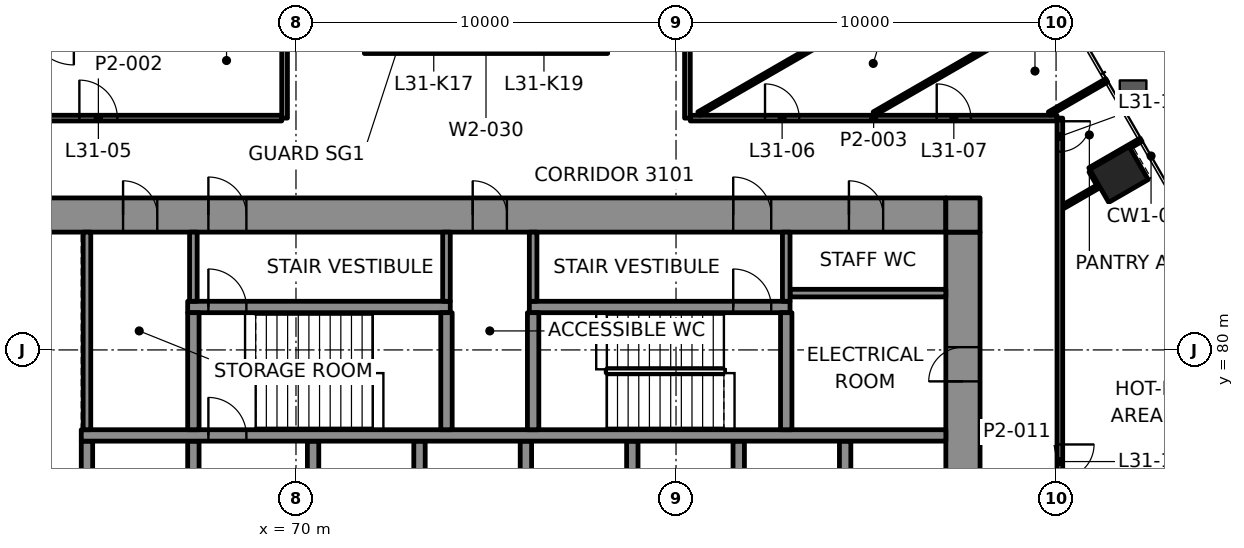
"""IFC4 building model, lengths in metres.
Left out: names, types, materials, properties, quantities, classifications, styles, units other than length and angle.
Written with IfcOpenShell. Run it as: python <this file> out.ifc"""

import sys

from ifc_helpers import new_model, si_unit, direction, frame, frame_2d, origin, origin_2d, place, context, subcontext, project, spatial, rectangle, extrude, element, fill, save


model = new_model("IFC4")
c1 = context("Model", 3, precision=1e-05, world=origin(), true_north=direction((0.0, 1.0)))
c2 = subcontext(c1, "Body", "Model", "MODEL_VIEW")
j1 = project(units=[si_unit("LENGTHUNIT", "METRE"), si_unit("PLANEANGLEUNIT", "RADIAN")], contexts=[c1])
p1 = place(None, origin())
s1 = spatial("IfcSite", under=j1, at=p1, CompositionType="ELEMENT")
p2 = place(p1, origin())
s2 = spatial("IfcBuilding", under=s1, at=p2, CompositionType="ELEMENT")
p3 = place(p2, frame((0.0, 0.0, 136.6)))
s3 = spatial("IfcBuildingStorey", under=s2, at=p3, CompositionType="ELEMENT", Elevation=136.6)
p4 = place(p3, frame((91.655, 84.616, -0.0), z_axis=(0.0, 0.0, 1.0), x_axis=(-0.5, 0.866025403784, 0.0)))
e1 = element("IfcColumn", 1, at=p4, inside=s3, PredefinedType="COLUMN", context=c2, shape_type="SweptSolid", body=[
    extrude(rectangle(XDim=1.0, YDim=1.2, at=origin_2d()), origin(), (0.0, 0.0, 1.0), 4.2),
])
p5 = place(p3, frame((62.0, 83.55, 0.0), z_axis=(0.0, 0.0, 1.0), x_axis=(1.0, 0.0, 0.0)))
e2 = element("IfcWall", 2, at=p5, inside=s3, PredefinedType="SHEAR", context=c2, shape_type="SweptSolid", body=[
    extrude(rectangle(XDim=25.1, YDim=0.9, at=frame_2d((12.55, 0.0))), origin(), (0.0, 0.0, 1.0), 3.9),
])
p6 = place(p5, frame((5.695, 0.0, 0.0)))
e3 = element("IfcOpeningElement", 3, at=p6, cuts=e2, PredefinedType="OPENING", context=c2, shape_type="SweptSolid", body=[
    extrude(rectangle(XDim=1.0, YDim=2.1, at=frame_2d((0.5, 1.05))), frame((0.0, 0.46, 0.0), z_axis=(0.0, -1.0, 0.0), x_axis=(1.0, 0.0, 0.0)), (0.0, 0.0, 1.0), 0.92),
])
p7 = place(p5, frame((19.505, 0.0, 0.0)))
e4 = element("IfcOpeningElement", 4, at=p7, cuts=e2, PredefinedType="OPENING", context=c2, shape_type="SweptSolid", body=[
    extrude(rectangle(XDim=1.0, YDim=2.1, at=frame_2d((0.5, 1.05))), frame((0.0, 0.46, 0.0), z_axis=(0.0, -1.0, 0.0), x_axis=(1.0, 0.0, 0.0)), (0.0, 0.0, 1.0), 0.92),
])
p8 = place(p5, frame((3.45, 0.0, 0.0)))
e5 = element("IfcOpeningElement", 5, at=p8, cuts=e2, PredefinedType="OPENING", context=c2, shape_type="SweptSolid", body=[
    extrude(rectangle(XDim=0.9, YDim=2.1, at=frame_2d((0.45, 1.05))), frame((0.0, 0.46, 0.0), z_axis=(0.0, -1.0, 0.0), x_axis=(1.0, 0.0, 0.0)), (0.0, 0.0, 1.0), 0.92),
])
p9 = place(p5, frame((12.65, 0.0, 0.0)))
e6 = element("IfcOpeningElement", 6, at=p9, cuts=e2, PredefinedType="OPENING", context=c2, shape_type="SweptSolid", body=[
    extrude(rectangle(XDim=0.9, YDim=2.1, at=frame_2d((0.45, 1.05))), frame((0.0, 0.46, 0.0), z_axis=(0.0, -1.0, 0.0), x_axis=(1.0, 0.0, 0.0)), (0.0, 0.0, 1.0), 0.92),
])
p10 = place(p5, frame((22.55, 0.0, 0.0)))
e7 = element("IfcOpeningElement", 7, at=p10, cuts=e2, PredefinedType="OPENING", context=c2, shape_type="SweptSolid", body=[
    extrude(rectangle(XDim=0.9, YDim=2.1, at=frame_2d((0.45, 1.05))), frame((0.0, 0.46, 0.0), z_axis=(0.0, -1.0, 0.0), x_axis=(1.0, 0.0, 0.0)), (0.0, 0.0, 1.0), 0.92),
])
p11 = place(p3, frame((87.55, 66.9, 0.0), z_axis=(0.0, 0.0, 1.0), x_axis=(0.0, 1.0, 0.0)))
e8 = element("IfcWall", 8, at=p11, inside=s3, PredefinedType="SHEAR", context=c2, shape_type="SweptSolid", body=[
    extrude(rectangle(XDim=16.2, YDim=0.9, at=frame_2d((8.1, 0.0))), origin(), (0.0, 0.0, 1.0), 3.9),
])
p12 = place(p11, frame((5.5, 0.0, 0.0)))
e9 = element("IfcOpeningElement", 9, at=p12, cuts=e8, PredefinedType="OPENING", context=c2, shape_type="SweptSolid", body=[
    extrude(rectangle(XDim=1.8, YDim=2.1, at=frame_2d((0.9, 1.05))), frame((0.0, 0.46, 0.0), z_axis=(0.0, -1.0, 0.0), x_axis=(1.0, 0.0, 0.0)), (0.0, 0.0, 1.0), 0.92),
])
p13 = place(p11, frame((12.272, 0.0, 0.0)))
e10 = element("IfcOpeningElement", 10, at=p13, cuts=e8, PredefinedType="OPENING", context=c2, shape_type="SweptSolid", body=[
    extrude(rectangle(XDim=0.9, YDim=2.1, at=frame_2d((0.45, 1.05))), frame((0.0, 0.46, 0.0), z_axis=(0.0, -1.0, 0.0), x_axis=(1.0, 0.0, 0.0)), (0.0, 0.0, 1.0), 0.92),
])
for number, where, z_axis, x_axis in (
    (11, (64.5, 75.0, 0.0), (0.0, 0.0, 1.0), (0.0, 1.0, 0.0)),
    (12, (67.3, 75.0, 0.0), (0.0, 0.0, 1.0), (0.0, 1.0, 0.0)),
):
    element("IfcWall", number, at=place(p3, frame(where, z_axis=z_axis, x_axis=x_axis)), inside=s3, PredefinedType="SHEAR", context=c2, shape_type="SweptSolid", body=[
        extrude(rectangle(XDim=2.6, YDim=0.3, at=frame_2d((1.3, 0.0))), origin(), (0.0, 0.0, 1.0), 3.9),
    ])
p14 = place(p3, frame((70.45, 75.0, 0.0), z_axis=(0.0, 0.0, 1.0), x_axis=(0.0, 1.0, 0.0)))
e13 = element("IfcWall", 13, at=p14, inside=s3, PredefinedType="SHEAR", context=c2, shape_type="SweptSolid", body=[
    extrude(rectangle(XDim=2.6, YDim=0.3, at=frame_2d((1.3, 0.0))), origin(), (0.0, 0.0, 1.0), 3.9),
])
p15 = place(p14, frame((0.15, 0.0, 0.0)))
e14 = element("IfcOpeningElement", 14, at=p15, cuts=e13, PredefinedType="OPENING", context=c2, shape_type="SweptSolid", body=[
    extrude(rectangle(XDim=1.1, YDim=2.1, at=frame_2d((0.55, 1.05))), frame((0.0, 0.16, 0.0), z_axis=(0.0, -1.0, 0.0), x_axis=(1.0, 0.0, 0.0)), (0.0, 0.0, 1.0), 0.32),
])
for number, where, z_axis, x_axis in (
    (15, (73.25, 75.0, 0.0), (0.0, 0.0, 1.0), (0.0, 1.0, 0.0)),
    (16, (76.05, 75.0, 0.0), (0.0, 0.0, 1.0), (0.0, 1.0, 0.0)),
    (17, (78.85, 75.0, 0.0), (0.0, 0.0, 1.0), (0.0, 1.0, 0.0)),
    (18, (81.65, 75.0, 0.0), (0.0, 0.0, 1.0), (0.0, 1.0, 0.0)),
    (19, (84.45, 75.0, 0.0), (0.0, 0.0, 1.0), (0.0, 1.0, 0.0)),
):
    element("IfcWall", number, at=place(p3, frame(where, z_axis=z_axis, x_axis=x_axis)), inside=s3, PredefinedType="SHEAR", context=c2, shape_type="SweptSolid", body=[
        extrude(rectangle(XDim=2.6, YDim=0.3, at=frame_2d((1.3, 0.0))), origin(), (0.0, 0.0, 1.0), 3.9),
    ])
p16 = place(p3, frame((64.35, 77.75, 0.0), z_axis=(0.0, 0.0, 1.0), x_axis=(1.0, 0.0, 0.0)))
e20 = element("IfcWall", 20, at=p16, inside=s3, PredefinedType="SHEAR", context=c2, shape_type="SweptSolid", body=[
    extrude(rectangle(XDim=22.75, YDim=0.3, at=frame_2d((11.375, 0.0))), origin(), (0.0, 0.0, 1.0), 3.9),
])
p17 = place(p16, frame((3.345, 0.0, 0.0)))
e21 = element("IfcOpeningElement", 21, at=p17, cuts=e20, PredefinedType="OPENING", context=c2, shape_type="SweptSolid", body=[
    extrude(rectangle(XDim=1.0, YDim=2.1, at=frame_2d((0.5, 1.05))), frame((0.0, 0.16, 0.0), z_axis=(0.0, -1.0, 0.0), x_axis=(1.0, 0.0, 0.0)), (0.0, 0.0, 1.0), 0.32),
])
p18 = place(p3, frame((67.15, 81.13, 0.0), z_axis=(0.0, 0.0, 1.0), x_axis=(1.0, 0.0, 0.0)))
e22 = element("IfcWall", 22, at=p18, inside=s3, PredefinedType="SHEAR", context=c2, shape_type="SweptSolid", body=[
    extrude(rectangle(XDim=6.91, YDim=0.3, at=frame_2d((3.455, 0.0))), origin(), (0.0, 0.0, 1.0), 3.9),
])
p19 = place(p18, frame((0.545, 0.0, 0.0)))
e23 = element("IfcOpeningElement", 23, at=p19, cuts=e22, PredefinedType="OPENING", context=c2, shape_type="SweptSolid", body=[
    extrude(rectangle(XDim=1.0, YDim=2.1, at=frame_2d((0.5, 1.05))), frame((0.0, 0.16, 0.0), z_axis=(0.0, -1.0, 0.0), x_axis=(1.0, 0.0, 0.0)), (0.0, 0.0, 1.0), 0.32),
])
p20 = place(p3, frame((76.14, 81.13, 0.0), z_axis=(0.0, 0.0, 1.0), x_axis=(1.0, 0.0, 0.0)))
e24 = element("IfcWall", 24, at=p20, inside=s3, PredefinedType="SHEAR", context=c2, shape_type="SweptSolid", body=[
    extrude(rectangle(XDim=6.86, YDim=0.3, at=frame_2d((3.43, 0.0))), origin(), (0.0, 0.0, 1.0), 3.9),
])
p21 = place(p20, frame((5.365, 0.0, 0.0)))
e25 = element("IfcOpeningElement", 25, at=p21, cuts=e24, PredefinedType="OPENING", context=c2, shape_type="SweptSolid", body=[
    extrude(rectangle(XDim=1.0, YDim=2.1, at=frame_2d((0.5, 1.05))), frame((0.0, 0.16, 0.0), z_axis=(0.0, -1.0, 0.0), x_axis=(1.0, 0.0, 0.0)), (0.0, 0.0, 1.0), 0.32),
])
for number, where, z_axis, x_axis in (
    (26, (67.3, 77.9, 0.0), (0.0, 0.0, 1.0), (0.0, 1.0, 0.0)),
    (27, (73.96, 77.9, 0.0), (0.0, 0.0, 1.0), (0.0, 1.0, 0.0)),
    (28, (76.24, 77.9, 0.0), (0.0, 0.0, 1.0), (0.0, 1.0, 0.0)),
    (29, (82.9, 77.9, 0.0), (0.0, 0.0, 1.0), (0.0, 1.0, 0.0)),
):
    element("IfcWall", number, at=place(p3, frame(where, z_axis=z_axis, x_axis=x_axis)), inside=s3, PredefinedType="SHEAR", context=c2, shape_type="SweptSolid", body=[
        extrude(rectangle(XDim=3.08, YDim=0.3, at=frame_2d((1.54, 0.0))), origin(), (0.0, 0.0, 1.0), 3.9),
    ])
p22 = place(p3, frame((71.8, 87.95, 0.0), z_axis=(0.0, 0.0, 1.0), x_axis=(1.0, 0.0, 0.0)))
e30 = element("IfcWall", 30, at=p22, inside=s3, PredefinedType="SHEAR", context=c2, shape_type="SweptSolid", body=[
    extrude(rectangle(XDim=6.4, YDim=0.3, at=frame_2d((3.2, 0.0))), origin(), (0.0, 0.0, 1.0), 3.9),
])
p23 = place(p22, frame((1.325, 0.0, 0.0)))
e31 = element("IfcOpeningElement", 31, at=p23, cuts=e30, PredefinedType="OPENING", context=c2, shape_type="SweptSolid", body=[
    extrude(rectangle(XDim=1.0, YDim=2.1, at=frame_2d((0.5, 1.05))), frame((0.0, 0.16, 0.0), z_axis=(0.0, -1.0, 0.0), x_axis=(1.0, 0.0, 0.0)), (0.0, 0.0, 1.0), 0.32),
])
p24 = place(p22, frame((4.125, 0.0, 0.0)))
e32 = element("IfcOpeningElement", 32, at=p24, cuts=e30, PredefinedType="OPENING", context=c2, shape_type="SweptSolid", body=[
    extrude(rectangle(XDim=1.2, YDim=2.1, at=frame_2d((0.6, 1.05))), frame((0.0, 0.16, 0.0), z_axis=(0.0, -1.0, 0.0), x_axis=(1.0, 0.0, 0.0)), (0.0, 0.0, 1.0), 0.32),
])
p25 = place(p3, frame((87.1, 83.55, 0.0), z_axis=(0.0, 0.0, 1.0), x_axis=(1.0, 0.0, 0.0)))
e33 = element("IfcWall", 33, at=p25, inside=s3, PredefinedType="SHEAR", context=c2, shape_type="SweptSolid", body=[
    extrude(rectangle(XDim=0.9, YDim=0.9, at=frame_2d((0.45, 0.0))), origin(), (0.0, 0.0, 1.0), 3.9),
])
p26 = place(p3, frame((59.976, 86.1, 0.0), z_axis=(0.0, 0.0, 1.0), x_axis=(1.0, 0.0, 0.0)))
e34 = element("IfcWall", 34, at=p26, inside=s3, PredefinedType="PARTITIONING", context=c2, shape_type="SweptSolid", body=[
    extrude(rectangle(XDim=9.649, YDim=0.15, at=frame_2d((4.825, 0.0))), origin(), (0.0, 0.0, 1.0), 3.3),
])
p27 = place(p26, frame((4.325, 0.0, 0.0)))
e35 = element("IfcOpeningElement", 35, at=p27, cuts=e34, PredefinedType="OPENING", context=c2, shape_type="SweptSolid", body=[
    extrude(rectangle(XDim=1.0, YDim=2.1, at=frame_2d((0.5, 1.05))), frame((0.0, 0.085, 0.0), z_axis=(0.0, -1.0, 0.0), x_axis=(1.0, 0.0, 0.0)), (0.0, 0.0, 1.0), 0.17),
])
p28 = place(p3, frame((80.375, 86.1, 0.0), z_axis=(0.0, 0.0, 1.0), x_axis=(1.0, 0.0, 0.0)))
e36 = element("IfcWall", 36, at=p28, inside=s3, PredefinedType="PARTITIONING", context=c2, shape_type="SweptSolid", body=[
    extrude(rectangle(XDim=9.65, YDim=0.15, at=frame_2d((4.825, 0.0))), origin(), (0.0, 0.0, 1.0), 3.3),
])
p29 = place(p28, frame((1.967, 0.0, 0.0)))
e37 = element("IfcOpeningElement", 37, at=p29, cuts=e36, PredefinedType="OPENING", context=c2, shape_type="SweptSolid", body=[
    extrude(rectangle(XDim=0.9, YDim=2.1, at=frame_2d((0.45, 1.05))), frame((0.0, 0.085, 0.0), z_axis=(0.0, -1.0, 0.0), x_axis=(1.0, 0.0, 0.0)), (0.0, 0.0, 1.0), 0.17),
])
p30 = place(p28, frame((6.485, 0.0, 0.0)))
e38 = element("IfcOpeningElement", 38, at=p30, cuts=e36, PredefinedType="OPENING", context=c2, shape_type="SweptSolid", body=[
    extrude(rectangle(XDim=0.9, YDim=2.1, at=frame_2d((0.45, 1.05))), frame((0.0, 0.085, 0.0), z_axis=(0.0, -1.0, 0.0), x_axis=(1.0, 0.0, 0.0)), (0.0, 0.0, 1.0), 0.17),
])
p31 = place(p3, frame((90.201, 83.776, 0.0), z_axis=(0.0, 0.0, 1.0), x_axis=(0.866034889475, 0.499983569942, 0.0)))
e39 = element("IfcWall", 39, at=p31, inside=s3, PredefinedType="PARTITIONING", context=c2, shape_type="SweptSolid", body=[
    extrude(rectangle(XDim=1.079, YDim=0.1, at=frame_2d((0.54, 0.0))), origin(), (0.0, 0.0, 1.0), 3.3),
])
p32 = place(p3, frame((90.885, 84.749, 0.0), z_axis=(0.0, 0.0, 1.0), x_axis=(0.866029224906, 0.499993381564, 0.0)))
e40 = element("IfcWall", 40, at=p32, inside=s3, PredefinedType="PARTITIONING", context=c2, shape_type="SweptSolid", body=[
    extrude(rectangle(XDim=1.56, YDim=0.1, at=frame_2d((0.78, 0.0))), origin(), (0.0, 0.0, 1.0), 3.065),
])
p33 = place(p3, frame((89.822, 86.22, 0.0), z_axis=(0.0, 0.0, 1.0), x_axis=(0.866022549299, 0.50000494408, 0.0)))
e41 = element("IfcWall", 41, at=p33, inside=s3, PredefinedType="PARTITIONING", context=c2, shape_type="SweptSolid", body=[
    extrude(rectangle(XDim=1.746, YDim=0.1, at=frame_2d((0.873, 0.0))), origin(), (0.0, 0.0, 1.0), 3.065),
])
p34 = place(p3, frame((85.211, 86.219, 0.0), z_axis=(0.0, 0.0, 1.0), x_axis=(0.866012033619, 0.50002315709, 0.0)))
e42 = element("IfcWall", 42, at=p34, inside=s3, PredefinedType="PARTITIONING", context=c2, shape_type="SweptSolid", body=[
    extrude(rectangle(XDim=5.74, YDim=0.1, at=frame_2d((2.87, 0.0))), origin(), (0.0, 0.0, 1.0), 3.065),
])
p35 = place(p3, frame((80.599, 86.22, 0.0), z_axis=(0.0, 0.0, 1.0), x_axis=(0.866015615191, 0.500016953958, 0.0)))
e43 = element("IfcWall", 43, at=p35, inside=s3, PredefinedType="PARTITIONING", context=c2, shape_type="SweptSolid", body=[
    extrude(rectangle(XDim=6.961, YDim=0.1, at=frame_2d((3.48, 0.0))), origin(), (0.0, 0.0, 1.0), 3.3),
])
p36 = place(p3, frame((90.1, 86.1, 0.0), z_axis=(0.0, 0.0, 1.0), x_axis=(0.0, -1.0, 0.0)))
e44 = element("IfcWall", 44, at=p36, inside=s3, PredefinedType="PARTITIONING", context=c2, shape_type="SweptSolid", body=[
    extrude(rectangle(XDim=18.779, YDim=0.15, at=frame_2d((9.389, 0.0))), origin(), (0.0, 0.0, 1.0), 3.3),
])
p37 = place(p36, frame((0.083, 0.0, 0.0)))
e45 = element("IfcOpeningElement", 45, at=p37, cuts=e44, PredefinedType="OPENING", context=c2, shape_type="SweptSolid", body=[
    extrude(rectangle(XDim=0.8, YDim=2.1, at=frame_2d((0.4, 1.05))), frame((0.0, 0.085, 0.0), z_axis=(0.0, -1.0, 0.0), x_axis=(1.0, 0.0, 0.0)), (0.0, 0.0, 1.0), 0.17),
])
p38 = place(p36, frame((8.588, 0.0, 0.0)))
e46 = element("IfcOpeningElement", 46, at=p38, cuts=e44, PredefinedType="OPENING", context=c2, shape_type="SweptSolid", body=[
    extrude(rectangle(XDim=0.9, YDim=2.1, at=frame_2d((0.45, 1.05))), frame((0.0, 0.085, 0.0), z_axis=(0.0, -1.0, 0.0), x_axis=(1.0, 0.0, 0.0)), (0.0, 0.0, 1.0), 0.17),
])
p39 = place(p36, frame((16.635, 0.0, 0.0)))
e47 = element("IfcOpeningElement", 47, at=p39, cuts=e44, PredefinedType="OPENING", context=c2, shape_type="SweptSolid", body=[
    extrude(rectangle(XDim=1.0, YDim=2.1, at=frame_2d((0.5, 1.05))), frame((0.0, 0.085, 0.0), z_axis=(0.0, -1.0, 0.0), x_axis=(1.0, 0.0, 0.0)), (0.0, 0.0, 1.0), 0.17),
])
for number, where, z_axis, x_axis in (
    (48, (80.3, 86.1, 0.0), (0.0, 0.0, 1.0), (0.0, 1.0, 0.0)),
    (49, (69.7, 86.1, 0.0), (0.0, 0.0, 1.0), (0.0, 1.0, 0.0)),
):
    element("IfcWall", number, at=place(p3, frame(where, z_axis=z_axis, x_axis=x_axis)), inside=s3, PredefinedType="PARTITIONING", context=c2, shape_type="SweptSolid", body=[
        extrude(rectangle(XDim=10.599, YDim=0.15, at=frame_2d((5.3, 0.0))), origin(), (0.0, 0.0, 1.0), 3.222),
    ])
p40 = place(p3, frame((91.106, 84.368, 0.0), z_axis=(0.0, 0.0, 1.0), x_axis=(-0.499975232926, 0.866039702589, 0.0)))
e50 = element("IfcWall", 50, at=p40, inside=s3, PredefinedType="PARTITIONING", context=c2, shape_type="SweptSolid", body=[
    extrude(rectangle(XDim=0.39, YDim=0.1, at=frame_2d((0.195, 0.0))), origin(), (0.0, 0.0, 1.0), 3.3),
])
p41 = place(p3, frame((83.0, 81.495, 0.0), z_axis=(0.0, 0.0, 1.0), x_axis=(1.0, 0.0, 0.0)))
e51 = element("IfcWall", 51, at=p41, inside=s3, PredefinedType="PARTITIONING", context=c2, shape_type="SweptSolid", body=[
    extrude(rectangle(XDim=4.1, YDim=0.2, at=frame_2d((2.05, 0.0))), origin(), (0.0, 0.0, 1.0), 3.9),
])
p42 = place(p3, frame((64.5, 77.9, 0.0), z_axis=(0.0, 0.0, 1.0), x_axis=(0.0, 1.0, 0.0)))
e52 = element("IfcWall", 52, at=p42, inside=s3, PredefinedType="PARTITIONING", context=c2, shape_type="SweptSolid", body=[
    extrude(rectangle(XDim=5.2, YDim=0.2, at=frame_2d((2.6, 0.0))), origin(), (0.0, 0.0, 1.0), 3.9),
])
for number, where, z_axis, x_axis in (
    (53, (67.3, 81.28, 0.0), (0.0, 0.0, 1.0), (0.0, 1.0, 0.0)),
    (54, (73.96, 81.28, 0.0), (0.0, 0.0, 1.0), (0.0, 1.0, 0.0)),
    (55, (76.24, 81.28, 0.0), (0.0, 0.0, 1.0), (0.0, 1.0, 0.0)),
    (56, (82.9, 81.28, 0.0), (0.0, 0.0, 1.0), (0.0, 1.0, 0.0)),
):
    element("IfcWall", number, at=place(p3, frame(where, z_axis=z_axis, x_axis=x_axis)), inside=s3, PredefinedType="PARTITIONING", context=c2, shape_type="SweptSolid", body=[
        extrude(rectangle(XDim=1.82, YDim=0.2, at=frame_2d((0.91, 0.0))), origin(), (0.0, 0.0, 1.0), 3.9),
    ])
p43 = place(p27, origin())
e57 = element("IfcDoor", 57, at=p43, inside=s3, OperationType="SINGLE_SWING_RIGHT", PredefinedType="DOOR", context=c2, shape_type="SweptSolid", body=[
    extrude(rectangle(XDim=1.0, YDim=2.1, at=frame_2d((0.5, 1.05))), frame((0.0, 0.025, 0.0), z_axis=(0.0, -1.0, 0.0), x_axis=(1.0, 0.0, 0.0)), (0.0, 0.0, 1.0), 0.05),
])
fill(e35, e57)
p44 = place(p29, origin())
e58 = element("IfcDoor", 58, at=p44, inside=s3, OperationType="SINGLE_SWING_RIGHT", PredefinedType="DOOR", context=c2, shape_type="SweptSolid", body=[
    extrude(rectangle(XDim=0.9, YDim=2.1, at=frame_2d((0.45, 1.05))), frame((0.0, 0.025, 0.0), z_axis=(0.0, -1.0, 0.0), x_axis=(1.0, 0.0, 0.0)), (0.0, 0.0, 1.0), 0.05),
])
fill(e37, e58)
p45 = place(p30, origin())
e59 = element("IfcDoor", 59, at=p45, inside=s3, OperationType="SINGLE_SWING_LEFT", PredefinedType="DOOR", context=c2, shape_type="SweptSolid", body=[
    extrude(rectangle(XDim=0.9, YDim=2.1, at=frame_2d((0.45, 1.05))), frame((0.0, 0.025, 0.0), z_axis=(0.0, -1.0, 0.0), x_axis=(1.0, 0.0, 0.0)), (0.0, 0.0, 1.0), 0.05),
])
fill(e38, e59)
p46 = place(p37, origin())
e60 = element("IfcDoor", 60, at=p46, inside=s3, OperationType="SINGLE_SWING_LEFT", PredefinedType="DOOR", context=c2, shape_type="SweptSolid", body=[
    extrude(rectangle(XDim=0.8, YDim=2.1, at=frame_2d((0.4, 1.05))), frame((0.0, 0.025, 0.0), z_axis=(0.0, -1.0, 0.0), x_axis=(1.0, 0.0, 0.0)), (0.0, 0.0, 1.0), 0.05),
])
fill(e45, e60)
p47 = place(p38, origin())
e61 = element("IfcDoor", 61, at=p47, inside=s3, OperationType="SINGLE_SWING_RIGHT", PredefinedType="DOOR", context=c2, shape_type="SweptSolid", body=[
    extrude(rectangle(XDim=0.9, YDim=2.1, at=frame_2d((0.45, 1.05))), frame((0.0, 0.025, 0.0), z_axis=(0.0, -1.0, 0.0), x_axis=(1.0, 0.0, 0.0)), (0.0, 0.0, 1.0), 0.05),
])
fill(e46, e61)
p48 = place(p17, origin())
e62 = element("IfcDoor", 62, at=p48, inside=s3, OperationType="SINGLE_SWING_LEFT", PredefinedType="DOOR", context=c2, shape_type="SweptSolid", body=[
    extrude(rectangle(XDim=1.0, YDim=2.1, at=frame_2d((0.5, 1.05))), frame((0.0, 0.025, 0.0), z_axis=(0.0, -1.0, 0.0), x_axis=(1.0, 0.0, 0.0)), (0.0, 0.0, 1.0), 0.05),
])
fill(e21, e62)
p49 = place(p19, origin())
e63 = element("IfcDoor", 63, at=p49, inside=s3, OperationType="SINGLE_SWING_RIGHT", PredefinedType="DOOR", context=c2, shape_type="SweptSolid", body=[
    extrude(rectangle(XDim=1.0, YDim=2.1, at=frame_2d((0.5, 1.05))), frame((0.0, 0.025, 0.0), z_axis=(0.0, -1.0, 0.0), x_axis=(1.0, 0.0, 0.0)), (0.0, 0.0, 1.0), 0.05),
])
fill(e23, e63)
p50 = place(p6, origin())
e64 = element("IfcDoor", 64, at=p50, inside=s3, OperationType="SINGLE_SWING_LEFT", PredefinedType="DOOR", context=c2, shape_type="SweptSolid", body=[
    extrude(rectangle(XDim=1.0, YDim=2.1, at=frame_2d((0.5, 1.05))), frame((0.0, 0.17, 0.0), z_axis=(0.0, -1.0, 0.0), x_axis=(1.0, 0.0, 0.0)), (0.0, 0.0, 1.0), 0.34),
])
fill(e3, e64)
p51 = place(p21, origin())
e65 = element("IfcDoor", 65, at=p51, inside=s3, OperationType="SINGLE_SWING_RIGHT", PredefinedType="DOOR", context=c2, shape_type="SweptSolid", body=[
    extrude(rectangle(XDim=1.0, YDim=2.1, at=frame_2d((0.5, 1.05))), frame((0.0, 0.025, 0.0), z_axis=(0.0, -1.0, 0.0), x_axis=(1.0, 0.0, 0.0)), (0.0, 0.0, 1.0), 0.05),
])
fill(e25, e65)
p52 = place(p7, origin())
e66 = element("IfcDoor", 66, at=p52, inside=s3, OperationType="SINGLE_SWING_LEFT", PredefinedType="DOOR", context=c2, shape_type="SweptSolid", body=[
    extrude(rectangle(XDim=1.0, YDim=2.1, at=frame_2d((0.5, 1.05))), frame((0.0, 0.17, 0.0), z_axis=(0.0, -1.0, 0.0), x_axis=(1.0, 0.0, 0.0)), (0.0, 0.0, 1.0), 0.34),
])
fill(e4, e66)
p53 = place(p8, origin())
e67 = element("IfcDoor", 67, at=p53, inside=s3, OperationType="SINGLE_SWING_RIGHT", PredefinedType="DOOR", context=c2, shape_type="SweptSolid", body=[
    extrude(rectangle(XDim=0.9, YDim=2.1, at=frame_2d((0.45, 1.05))), frame((0.0, 0.17, 0.0), z_axis=(0.0, -1.0, 0.0), x_axis=(1.0, 0.0, 0.0)), (0.0, 0.0, 1.0), 0.34),
])
fill(e5, e67)
p54 = place(p9, origin())
e68 = element("IfcDoor", 68, at=p54, inside=s3, OperationType="SINGLE_SWING_LEFT", PredefinedType="DOOR", context=c2, shape_type="SweptSolid", body=[
    extrude(rectangle(XDim=0.9, YDim=2.1, at=frame_2d((0.45, 1.05))), frame((0.0, 0.17, 0.0), z_axis=(0.0, -1.0, 0.0), x_axis=(1.0, 0.0, 0.0)), (0.0, 0.0, 1.0), 0.34),
])
fill(e6, e68)
p55 = place(p13, origin())
e69 = element("IfcDoor", 69, at=p55, inside=s3, OperationType="SINGLE_SWING_RIGHT", PredefinedType="DOOR", context=c2, shape_type="SweptSolid", body=[
    extrude(rectangle(XDim=0.9, YDim=2.1, at=frame_2d((0.45, 1.05))), frame((0.0, 0.17, 0.0), z_axis=(0.0, -1.0, 0.0), x_axis=(1.0, 0.0, 0.0)), (0.0, 0.0, 1.0), 0.34),
])
fill(e10, e69)
p56 = place(p10, origin())
e70 = element("IfcDoor", 70, at=p56, inside=s3, OperationType="SINGLE_SWING_LEFT", PredefinedType="DOOR", context=c2, shape_type="SweptSolid", body=[
    extrude(rectangle(XDim=0.9, YDim=2.1, at=frame_2d((0.45, 1.05))), frame((0.0, 0.17, 0.0), z_axis=(0.0, -1.0, 0.0), x_axis=(1.0, 0.0, 0.0)), (0.0, 0.0, 1.0), 0.34),
])
fill(e7, e70)
save(model, sys.argv[1])
